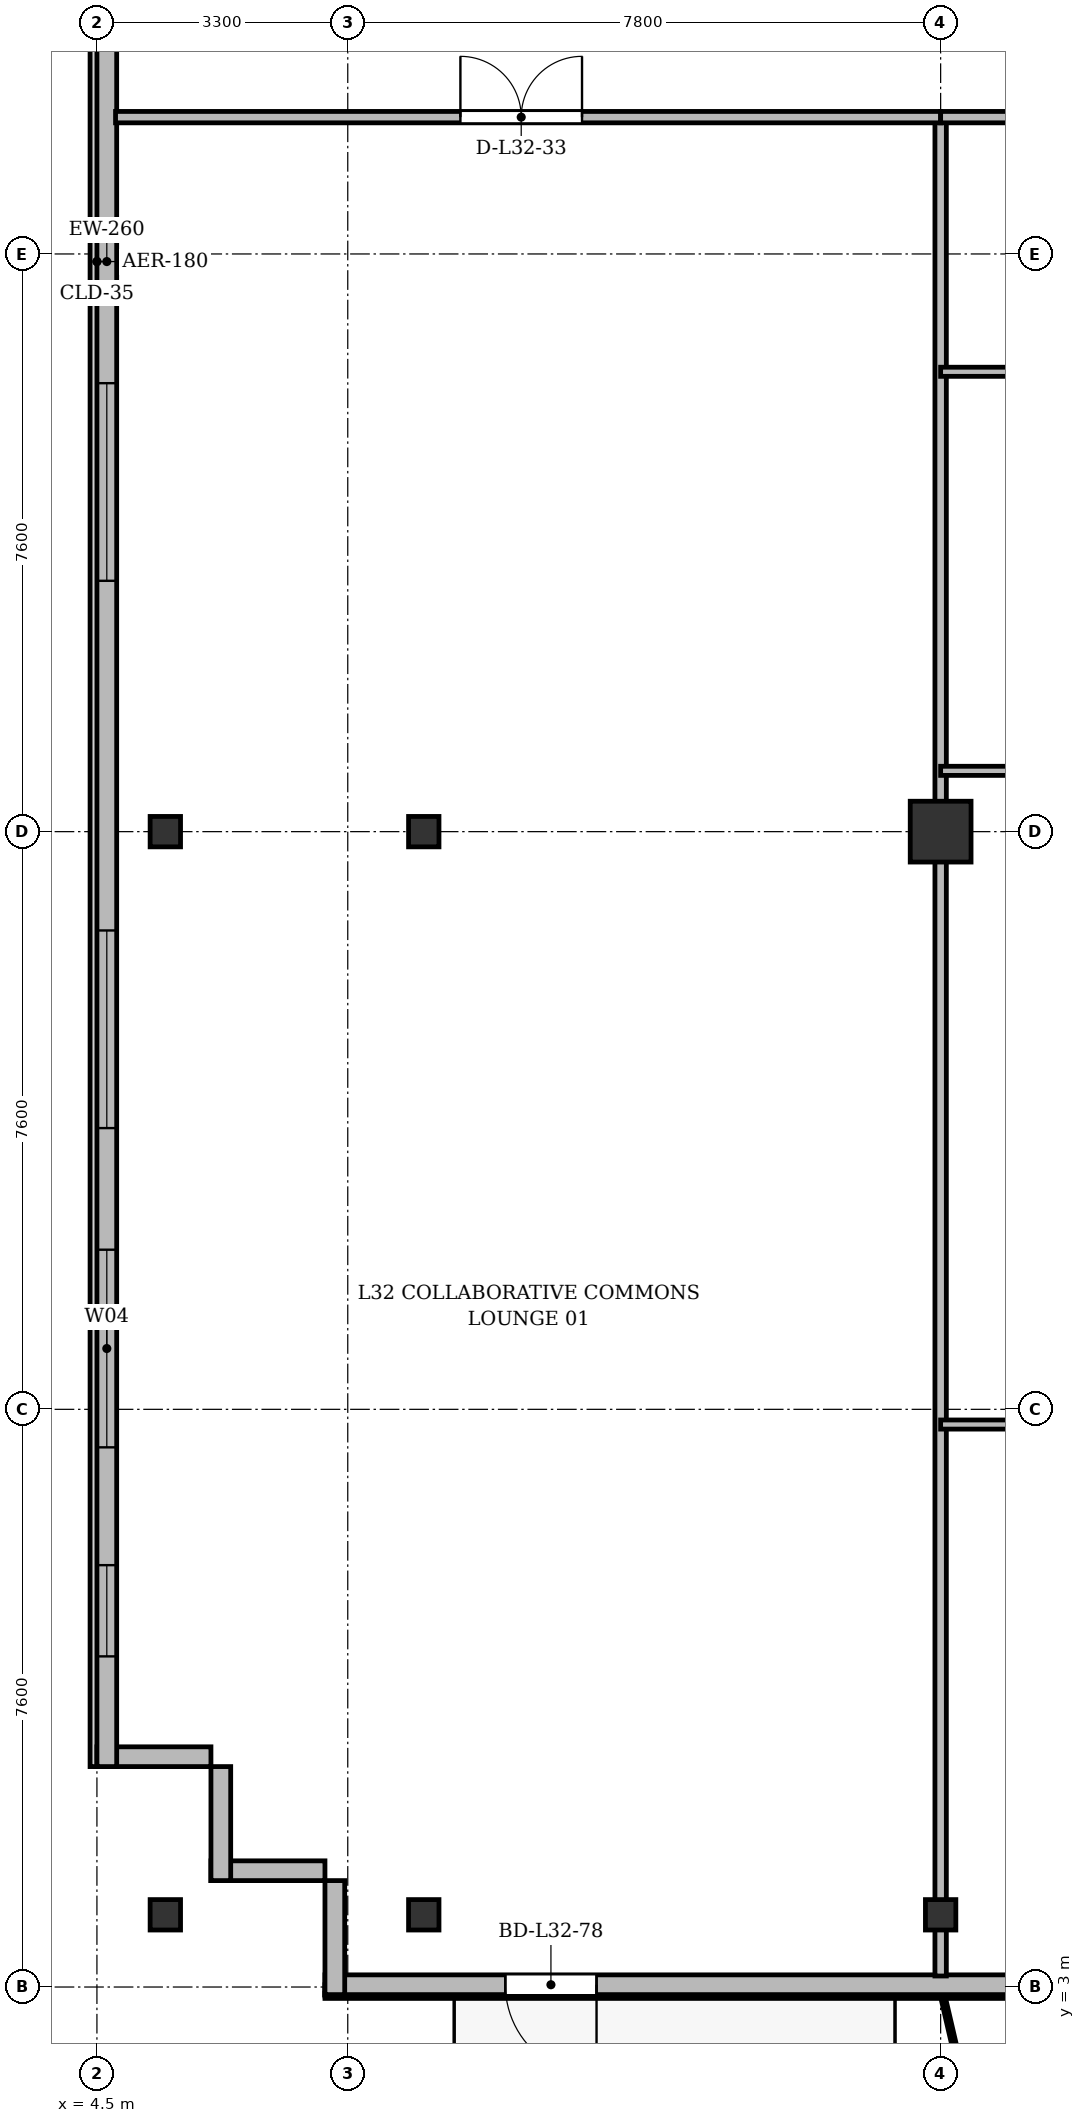
"""IFC4 building model, lengths in metres.
Left out: names, types, materials, properties, quantities, classifications, styles, units other than length and angle.
Written with IfcOpenShell. Run it as: python <this file> out.ifc"""

import sys

from ifc_helpers import new_model, si_unit, direction, frame, frame_2d, origin, origin_2d, place, context, subcontext, project, spatial, rectangle, i_section, extrude, source, transform, mapped, element, fill, save


model = new_model("IFC4")
c1 = context("Model", 3, precision=1e-05, world=origin(), true_north=direction((0.0, 1.0)))
c2 = subcontext(c1, "Body", "Model", "MODEL_VIEW")
j1 = project(units=[si_unit("LENGTHUNIT", "METRE"), si_unit("PLANEANGLEUNIT", "RADIAN")], contexts=[c1])
p1 = place(None, origin())
s1 = spatial("IfcSite", under=j1, at=p1, CompositionType="ELEMENT")
p2 = place(p1, origin())
s2 = spatial("IfcBuilding", under=s1, at=p2, CompositionType="ELEMENT")
p3 = place(p2, frame((0.0, 0.0, 124.9)))
s3 = spatial("IfcBuildingStorey", under=s2, at=p3, CompositionType="ELEMENT", Elevation=124.9)
m1 = source(origin(), c2, "Body", "SweptSolid", [
    extrude(i_section(OverallWidth=0.4, OverallDepth=0.4, WebThickness=0.022, FlangeThickness=0.035, at=origin_2d()), origin(), (0.0, 0.0, 1.0), 3.6),
])
for number, where, z_axis, x_axis in (
    (1, (5.4, 3.95, 0.0), (0.0, 0.0, 1.0), (1.0, 0.0, 0.0)),
    (2, (5.4, 18.2, 0.0), (0.0, 0.0, 1.0), (1.0, 0.0, 0.0)),
    (3, (8.8, 3.95, 0.0), (0.0, 0.0, 1.0), (1.0, 0.0, 0.0)),
    (4, (8.8, 18.2, 0.0), (0.0, 0.0, 1.0), (1.0, 0.0, 0.0)),
    (5, (15.6, 3.95, 0.0), (0.0, 0.0, 1.0), (1.0, 0.0, 0.0)),
):
    element("IfcColumn", number, at=place(p3, frame(where, z_axis=z_axis, x_axis=x_axis)), inside=s3, PredefinedType="COLUMN", context=c2, shape_type="MappedRepresentation", body=[
        mapped(m1, transform((0.0, 0.0, 0.0), x_axis=(1.0, 0.0, 0.0), y_axis=(0.0, 1.0, 0.0), z_axis=(0.0, 0.0, 1.0), scale=1.0)),
    ])
m2 = source(origin(), c2, "Body", "SweptSolid", [
    extrude(rectangle(XDim=0.8, YDim=0.8, at=origin_2d()), origin(), (0.0, 0.0, 1.0), 3.6),
])
p4 = place(p3, frame((15.6, 18.2, 0.0), z_axis=(0.0, 0.0, 1.0), x_axis=(1.0, 0.0, 0.0)))
e6 = element("IfcColumn", 6, at=p4, inside=s3, PredefinedType="COLUMN", context=c2, shape_type="MappedRepresentation", body=[
    mapped(m2, transform((0.0, 0.0, 0.0), x_axis=(1.0, 0.0, 0.0), y_axis=(0.0, 1.0, 0.0), z_axis=(0.0, 0.0, 1.0), scale=1.0)),
])
for number, where, z_axis, x_axis in (
    (7, (7.5, 4.53, 0.0), (0.0, 0.0, 1.0), (-1.0, 0.0, 0.0)),
    (8, (6.13, 4.4, 0.0), (0.0, 0.0, 1.0), (0.0, 1.0, 0.0)),
):
    element("IfcWall", number, at=place(p3, frame(where, z_axis=z_axis, x_axis=x_axis)), inside=s3, PredefinedType="SOLIDWALL", context=c2, shape_type="SweptSolid", body=[
        extrude(rectangle(XDim=1.5, YDim=0.26, at=frame_2d((0.75, 0.0))), origin(), (0.0, 0.0, 1.0), 3.34),
    ])
p5 = place(p3, frame((6.0, 6.03, 0.0), z_axis=(0.0, 0.0, 1.0), x_axis=(-1.0, 0.0, 0.0)))
e9 = element("IfcWall", 9, at=p5, inside=s3, PredefinedType="SOLIDWALL", context=c2, shape_type="SweptSolid", body=[
    extrude(rectangle(XDim=1.5, YDim=0.26, at=frame_2d((0.75, 0.0))), origin(), (0.0, 0.0, 1.0), 2.84),
])
p6 = place(p3, frame((4.63, 5.9, 0.0), z_axis=(0.0, 0.0, 1.0), x_axis=(0.0, 1.0, 0.0)))
e10 = element("IfcWall", 10, at=p6, inside=s3, PredefinedType="SOLIDWALL", context=c2, shape_type="SweptSolid", body=[
    extrude(rectangle(XDim=39.6, YDim=0.26, at=frame_2d((19.8, 0.0))), origin(), (0.0, 0.0, 1.0), 3.34),
])
p7 = place(p6, frame((1.45, 0.0, 0.92)))
e11 = element("IfcOpeningElement", 11, at=p7, cuts=e10, PredefinedType="OPENING", context=c2, shape_type="SweptSolid", body=[
    extrude(rectangle(XDim=1.2, YDim=1.65, at=frame_2d((0.6, 0.825))), frame((0.0, 0.14, 0.0), z_axis=(0.0, -1.0, 0.0), x_axis=(1.0, 0.0, 0.0)), (0.0, 0.0, 1.0), 0.28),
])
p8 = place(p6, frame((4.2, 0.0, 0.92)))
e12 = element("IfcOpeningElement", 12, at=p8, cuts=e10, PredefinedType="OPENING", context=c2, shape_type="SweptSolid", body=[
    extrude(rectangle(XDim=2.6, YDim=1.9, at=frame_2d((1.3, 0.95))), frame((0.0, 0.14, 0.0), z_axis=(0.0, -1.0, 0.0), x_axis=(1.0, 0.0, 0.0)), (0.0, 0.0, 1.0), 0.28),
])
p9 = place(p6, frame((8.4, 0.0, 0.92)))
e13 = element("IfcOpeningElement", 13, at=p9, cuts=e10, PredefinedType="OPENING", context=c2, shape_type="SweptSolid", body=[
    extrude(rectangle(XDim=2.6, YDim=1.9, at=frame_2d((1.3, 0.95))), frame((0.0, 0.14, 0.0), z_axis=(0.0, -1.0, 0.0), x_axis=(1.0, 0.0, 0.0)), (0.0, 0.0, 1.0), 0.28),
])
p10 = place(p6, frame((15.6, 0.0, 0.92)))
e14 = element("IfcOpeningElement", 14, at=p10, cuts=e10, PredefinedType="OPENING", context=c2, shape_type="SweptSolid", body=[
    extrude(rectangle(XDim=2.6, YDim=1.9, at=frame_2d((1.3, 0.95))), frame((0.0, 0.14, 0.0), z_axis=(0.0, -1.0, 0.0), x_axis=(1.0, 0.0, 0.0)), (0.0, 0.0, 1.0), 0.28),
])
p11 = place(p6, frame((29.6, 0.0, 0.92)))
e15 = element("IfcOpeningElement", 15, at=p11, cuts=e10, PredefinedType="OPENING", context=c2, shape_type="SweptSolid", body=[
    extrude(rectangle(XDim=2.6, YDim=1.9, at=frame_2d((1.3, 0.95))), frame((0.0, 0.14, 0.0), z_axis=(0.0, -1.0, 0.0), x_axis=(1.0, 0.0, 0.0)), (0.0, 0.0, 1.0), 0.28),
])
p12 = place(p6, frame((37.25, 0.0, 0.92)))
e16 = element("IfcOpeningElement", 16, at=p12, cuts=e10, PredefinedType="OPENING", context=c2, shape_type="SweptSolid", body=[
    extrude(rectangle(XDim=1.2, YDim=1.65, at=frame_2d((0.6, 0.825))), frame((0.0, 0.14, 0.0), z_axis=(0.0, -1.0, 0.0), x_axis=(1.0, 0.0, 0.0)), (0.0, 0.0, 1.0), 0.28),
])
p13 = place(p3, frame((44.8, 3.03, 0.0), z_axis=(0.0, 0.0, 1.0), x_axis=(-1.0, 0.0, 0.0)))
e17 = element("IfcWall", 17, at=p13, inside=s3, PredefinedType="SOLIDWALL", context=c2, shape_type="SweptSolid", body=[
    extrude(rectangle(XDim=37.3, YDim=0.26, at=frame_2d((18.65, 0.0))), origin(), (0.0, 0.0, 1.0), 3.34),
])
p14 = place(p13, frame((2.9, 0.0, 0.9)))
e18 = element("IfcOpeningElement", 18, at=p14, cuts=e17, PredefinedType="OPENING", context=c2, shape_type="SweptSolid", body=[
    extrude(rectangle(XDim=2.0, YDim=1.95, at=frame_2d((1.0, 0.975))), frame((0.0, 0.14, 0.0), z_axis=(0.0, -1.0, 0.0), x_axis=(1.0, 0.0, 0.0)), (0.0, 0.0, 1.0), 0.28),
])
p15 = place(p13, frame((9.675, 0.0, 0.9)))
e19 = element("IfcOpeningElement", 19, at=p15, cuts=e17, PredefinedType="OPENING", context=c2, shape_type="SweptSolid", body=[
    extrude(rectangle(XDim=1.65, YDim=1.85, at=frame_2d((0.825, 0.925))), frame((0.0, 0.14, 0.0), z_axis=(0.0, -1.0, 0.0), x_axis=(1.0, 0.0, 0.0)), (0.0, 0.0, 1.0), 0.28),
])
p16 = place(p13, frame((17.109, 0.0, 0.0)))
e20 = element("IfcOpeningElement", 20, at=p16, cuts=e17, PredefinedType="OPENING", context=c2, shape_type="SweptSolid", body=[
    extrude(rectangle(XDim=1.2, YDim=2.2, at=frame_2d((0.6, 1.1))), frame((0.0, 0.14, 0.0), z_axis=(0.0, -1.0, 0.0), x_axis=(1.0, 0.0, 0.0)), (0.0, 0.0, 1.0), 0.28),
])
p17 = place(p13, frame((22.25, 0.0, 0.9)))
e21 = element("IfcOpeningElement", 21, at=p17, cuts=e17, PredefinedType="OPENING", context=c2, shape_type="SweptSolid", body=[
    extrude(rectangle(XDim=2.2, YDim=1.8, at=frame_2d((1.1, 0.9))), frame((0.0, 0.14, 0.0), z_axis=(0.0, -1.0, 0.0), x_axis=(1.0, 0.0, 0.0)), (0.0, 0.0, 1.0), 0.28),
])
p18 = place(p13, frame((26.5, 0.0, 0.9)))
e22 = element("IfcOpeningElement", 22, at=p18, cuts=e17, PredefinedType="OPENING", context=c2, shape_type="SweptSolid", body=[
    extrude(rectangle(XDim=1.5, YDim=1.75, at=frame_2d((0.75, 0.875))), frame((0.0, 0.14, 0.0), z_axis=(0.0, -1.0, 0.0), x_axis=(1.0, 0.0, 0.0)), (0.0, 0.0, 1.0), 0.28),
])
p19 = place(p13, frame((33.727, 0.0, 0.0)))
e23 = element("IfcOpeningElement", 23, at=p19, cuts=e17, PredefinedType="OPENING", context=c2, shape_type="SweptSolid", body=[
    extrude(rectangle(XDim=1.2, YDim=2.2, at=frame_2d((0.6, 1.1))), frame((0.0, 0.14, 0.0), z_axis=(0.0, -1.0, 0.0), x_axis=(1.0, 0.0, 0.0)), (0.0, 0.0, 1.0), 0.28),
])
p20 = place(p3, frame((7.63, 2.9, 0.0), z_axis=(0.0, 0.0, 1.0), x_axis=(0.0, 1.0, 0.0)))
e24 = element("IfcWall", 24, at=p20, inside=s3, PredefinedType="SOLIDWALL", context=c2, shape_type="SweptSolid", body=[
    extrude(rectangle(XDim=1.5, YDim=0.26, at=frame_2d((0.75, 0.0))), origin(), (0.0, 0.0, 1.0), 2.752),
])
p21 = place(p3, frame((15.6, 3.145, 0.0), z_axis=(0.0, 0.0, 1.0), x_axis=(0.0, 1.0, 0.0)))
e25 = element("IfcWall", 25, at=p21, inside=s3, PredefinedType="PARTITIONING", context=c2, shape_type="SweptSolid", body=[
    extrude(rectangle(XDim=24.455, YDim=0.15, at=frame_2d((12.228, 0.0))), origin(), (0.0, 0.0, 1.0), 2.84),
])
p22 = place(p3, frame((4.745, 27.6, 0.0), z_axis=(0.0, 0.0, 1.0), x_axis=(1.0, 0.0, 0.0)))
e26 = element("IfcWall", 26, at=p22, inside=s3, PredefinedType="PARTITIONING", context=c2, shape_type="SweptSolid", body=[
    extrude(rectangle(XDim=10.855, YDim=0.15, at=frame_2d((5.427, 0.0))), origin(), (0.0, 0.0, 1.0), 2.84),
])
p23 = place(p22, frame((4.537, 0.0, 0.0)))
e27 = element("IfcOpeningElement", 27, at=p23, cuts=e26, PredefinedType="OPENING", context=c2, shape_type="SweptSolid", body=[
    extrude(rectangle(XDim=1.6, YDim=2.2, at=frame_2d((0.8, 1.1))), frame((0.0, 0.085, 0.0), z_axis=(0.0, -1.0, 0.0), x_axis=(1.0, 0.0, 0.0)), (0.0, 0.0, 1.0), 0.17),
])
p24 = place(p3, frame((15.6, 19.0, 0.0), z_axis=(0.0, 0.0, 1.0), x_axis=(1.0, 0.0, 0.0)))
e28 = element("IfcWall", 28, at=p24, inside=s3, PredefinedType="PARTITIONING", context=c2, shape_type="SweptSolid", body=[
    extrude(rectangle(XDim=7.8, YDim=0.12, at=frame_2d((3.9, 0.0))), origin(), (0.0, 0.0, 1.0), 2.84),
])
p25 = place(p24, frame((3.333, 0.0, 0.0)))
e29 = element("IfcOpeningElement", 29, at=p25, cuts=e28, PredefinedType="OPENING", context=c2, shape_type="SweptSolid", body=[
    extrude(rectangle(XDim=0.95, YDim=2.15, at=frame_2d((0.475, 1.075))), frame((0.0, 0.07, 0.0), z_axis=(0.0, -1.0, 0.0), x_axis=(1.0, 0.0, 0.0)), (0.0, 0.0, 1.0), 0.14),
])
p26 = place(p3, frame((15.6, 24.25, 0.0), z_axis=(0.0, 0.0, 1.0), x_axis=(1.0, 0.0, 0.0)))
e30 = element("IfcWall", 30, at=p26, inside=s3, PredefinedType="PARTITIONING", context=c2, shape_type="SweptSolid", body=[
    extrude(rectangle(XDim=2.4, YDim=0.12, at=frame_2d((1.2, 0.0))), origin(), (0.0, 0.0, 1.0), 2.84),
])
p27 = place(p3, frame((15.6, 27.6, 0.0), z_axis=(0.0, 0.0, 1.0), x_axis=(1.0, 0.0, 0.0)))
e31 = element("IfcWall", 31, at=p27, inside=s3, PredefinedType="PARTITIONING", context=c2, shape_type="SweptSolid", body=[
    extrude(rectangle(XDim=7.8, YDim=0.15, at=frame_2d((3.9, 0.0))), origin(), (0.0, 0.0, 1.0), 2.84),
])
p28 = place(p27, frame((5.172, 0.0, 0.0)))
e32 = element("IfcOpeningElement", 32, at=p28, cuts=e31, PredefinedType="OPENING", context=c2, shape_type="SweptSolid", body=[
    extrude(rectangle(XDim=0.95, YDim=2.15, at=frame_2d((0.475, 1.075))), frame((0.0, 0.085, 0.0), z_axis=(0.0, -1.0, 0.0), x_axis=(1.0, 0.0, 0.0)), (0.0, 0.0, 1.0), 0.17),
])
p29 = place(p3, frame((15.6, 10.4, 0.0), z_axis=(0.0, 0.0, 1.0), x_axis=(1.0, 0.0, 0.0)))
e33 = element("IfcWall", 33, at=p29, inside=s3, PredefinedType="PARTITIONING", context=c2, shape_type="SweptSolid", body=[
    extrude(rectangle(XDim=3.9, YDim=0.12, at=frame_2d((1.95, 0.0))), origin(), (0.0, 0.0, 1.0), 2.84),
])
p30 = place(p29, frame((1.475, 0.0, 0.0)))
e34 = element("IfcOpeningElement", 34, at=p30, cuts=e33, PredefinedType="OPENING", context=c2, shape_type="SweptSolid", body=[
    extrude(rectangle(XDim=0.95, YDim=2.15, at=frame_2d((0.475, 1.075))), frame((0.0, 0.07, 0.0), z_axis=(0.0, -1.0, 0.0), x_axis=(1.0, 0.0, 0.0)), (0.0, 0.0, 1.0), 0.14),
])
m3 = source(origin(), c2, "Body", "SweptSolid", [
    extrude(rectangle(XDim=1.2, YDim=1.65, at=frame_2d((0.6, 0.825))), frame((0.0, 0.03, 0.0), z_axis=(0.0, -1.0, 0.0), x_axis=(1.0, 0.0, 0.0)), (0.0, 0.0, 1.0), 0.06),
])
p31 = place(p7, origin())
e35 = element("IfcWindow", 35, at=p31, inside=s3, PartitioningType="SINGLE_PANEL", PredefinedType="WINDOW", context=c2, shape_type="MappedRepresentation", body=[
    mapped(m3, transform((0.0, 0.0, 0.0), x_axis=(1.0, 0.0, 0.0), y_axis=(0.0, 1.0, 0.0), z_axis=(0.0, 0.0, 1.0), scale=1.0)),
])
fill(e11, e35)
m4 = source(origin(), c2, "Body", "SweptSolid", [
    extrude(rectangle(XDim=2.6, YDim=1.9, at=frame_2d((1.3, 0.95))), frame((0.0, 0.03, 0.0), z_axis=(0.0, -1.0, 0.0), x_axis=(1.0, 0.0, 0.0)), (0.0, 0.0, 1.0), 0.06),
])
p32 = place(p8, origin())
e36 = element("IfcWindow", 36, at=p32, inside=s3, PartitioningType="SINGLE_PANEL", PredefinedType="WINDOW", context=c2, shape_type="MappedRepresentation", body=[
    mapped(m4, transform((0.0, 0.0, 0.0), x_axis=(1.0, 0.0, 0.0), y_axis=(0.0, 1.0, 0.0), z_axis=(0.0, 0.0, 1.0), scale=1.0)),
])
fill(e12, e36)
p33 = place(p9, origin())
e37 = element("IfcWindow", 37, at=p33, inside=s3, PartitioningType="SINGLE_PANEL", PredefinedType="WINDOW", context=c2, shape_type="MappedRepresentation", body=[
    mapped(m4, transform((0.0, 0.0, 0.0), x_axis=(1.0, 0.0, 0.0), y_axis=(0.0, 1.0, 0.0), z_axis=(0.0, 0.0, 1.0), scale=1.0)),
])
fill(e13, e37)
p34 = place(p10, origin())
e38 = element("IfcWindow", 38, at=p34, inside=s3, PartitioningType="SINGLE_PANEL", PredefinedType="WINDOW", context=c2, shape_type="MappedRepresentation", body=[
    mapped(m4, transform((0.0, 0.0, 0.0), x_axis=(1.0, 0.0, 0.0), y_axis=(0.0, 1.0, 0.0), z_axis=(0.0, 0.0, 1.0), scale=1.0)),
])
fill(e14, e38)
m5 = source(origin(), c2, "Body", "SweptSolid", [
    extrude(rectangle(XDim=1.2, YDim=2.2, at=frame_2d((0.6, 1.1))), frame((0.0, 0.025, 0.0), z_axis=(0.0, -1.0, 0.0), x_axis=(1.0, 0.0, 0.0)), (0.0, 0.0, 1.0), 0.05),
])
p35 = place(p19, origin())
e39 = element("IfcDoor", 39, at=p35, inside=s3, OperationType="SINGLE_SWING_LEFT", PredefinedType="DOOR", context=c2, shape_type="MappedRepresentation", body=[
    mapped(m5, transform((0.0, 0.0, 0.0), x_axis=(1.0, 0.0, 0.0), y_axis=(0.0, 1.0, 0.0), z_axis=(0.0, 0.0, 1.0), scale=1.0)),
])
fill(e23, e39)
m6 = source(origin(), c2, "Body", "SweptSolid", [
    extrude(rectangle(XDim=1.6, YDim=2.2, at=frame_2d((0.8, 1.1))), frame((0.0, 0.025, 0.0), z_axis=(0.0, -1.0, 0.0), x_axis=(1.0, 0.0, 0.0)), (0.0, 0.0, 1.0), 0.05),
])
p36 = place(p23, origin())
e40 = element("IfcDoor", 40, at=p36, inside=s3, OperationType="DOUBLE_DOOR_SINGLE_SWING", PredefinedType="DOOR", context=c2, shape_type="MappedRepresentation", body=[
    mapped(m6, transform((0.0, 0.0, 0.0), x_axis=(1.0, 0.0, 0.0), y_axis=(0.0, 1.0, 0.0), z_axis=(0.0, 0.0, 1.0), scale=1.0)),
])
fill(e27, e40)
save(model, sys.argv[1])
